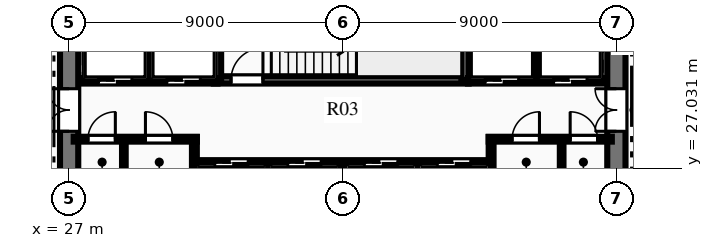
"""IFC4 building model, lengths in metres.
Left out: names, types, materials, properties, quantities, classifications, styles, units other than length and angle.
Written with IfcOpenShell. Run it as: python <this file> out.ifc"""

import sys

from ifc_helpers import new_model, si_unit, direction, frame, frame_2d, origin, place, context, subcontext, project, spatial, rectangle, extrude, element, fill, save


model = new_model("IFC4")
c1 = context("Model", 3, precision=1e-05, world=origin(), true_north=direction((0.0, 1.0)))
c2 = subcontext(c1, "Body", "Model", "MODEL_VIEW")
j1 = project(units=[si_unit("LENGTHUNIT", "METRE"), si_unit("PLANEANGLEUNIT", "RADIAN")], contexts=[c1])
p1 = place(None, origin())
s1 = spatial("IfcSite", under=j1, at=p1, CompositionType="ELEMENT")
p2 = place(p1, origin())
s2 = spatial("IfcBuilding", under=s1, at=p2, CompositionType="ELEMENT")
p3 = place(p2, frame((0.0, 0.0, 66.45)))
s3 = spatial("IfcBuildingStorey", under=s2, at=p3, CompositionType="ELEMENT", Elevation=66.45)
p4 = place(p3, frame((27.0, 18.3, 0.0), z_axis=(0.0, 0.0, 1.0), x_axis=(0.0, 1.0, 0.0)))
e1 = element("IfcWall", 1, at=p4, inside=s3, PredefinedType="SHEAR", context=c2, shape_type="SweptSolid", body=[
    extrude(rectangle(XDim=15.4, YDim=0.6, at=frame_2d((7.7, 0.0))), origin(), (0.0, 0.0, 1.0), 3.75),
])
p5 = place(p4, frame((9.94, 0.0, 0.0)))
e2 = element("IfcOpeningElement", 2, at=p5, cuts=e1, PredefinedType="OPENING", context=c2, shape_type="SweptSolid", body=[
    extrude(rectangle(XDim=1.4, YDim=2.2, at=frame_2d((0.7, 1.1))), frame((0.0, 0.31, 0.0), z_axis=(0.0, -1.0, 0.0), x_axis=(1.0, 0.0, 0.0)), (0.0, 0.0, 1.0), 0.62),
])
p6 = place(p3, frame((45.0, 18.3, 0.0), z_axis=(0.0, 0.0, 1.0), x_axis=(0.0, 1.0, 0.0)))
e3 = element("IfcWall", 3, at=p6, inside=s3, PredefinedType="SHEAR", context=c2, shape_type="SweptSolid", body=[
    extrude(rectangle(XDim=15.4, YDim=0.6, at=frame_2d((7.7, 0.0))), origin(), (0.0, 0.0, 1.0), 3.75),
])
p7 = place(p6, frame((9.94, 0.0, 0.0)))
e4 = element("IfcOpeningElement", 4, at=p7, cuts=e3, PredefinedType="OPENING", context=c2, shape_type="SweptSolid", body=[
    extrude(rectangle(XDim=1.4, YDim=2.2, at=frame_2d((0.7, 1.1))), frame((0.0, 0.31, 0.0), z_axis=(0.0, -1.0, 0.0), x_axis=(1.0, 0.0, 0.0)), (0.0, 0.0, 1.0), 0.62),
])
p8 = place(p3, frame((31.76, 29.93, 0.0), z_axis=(0.0, 0.0, 1.0), x_axis=(1.0, 0.0, 0.0)))
e5 = element("IfcWall", 5, at=p8, inside=s3, PredefinedType="SHEAR", context=c2, shape_type="SweptSolid", body=[
    extrude(rectangle(XDim=8.38, YDim=0.24, at=frame_2d((4.19, 0.0))), origin(), (0.0, 0.0, 1.0), 3.75),
])
p9 = place(p8, frame((0.565, 0.0, 0.0)))
e6 = element("IfcOpeningElement", 6, at=p9, cuts=e5, PredefinedType="OPENING", context=c2, shape_type="SweptSolid", body=[
    extrude(rectangle(XDim=1.05, YDim=2.15, at=frame_2d((0.525, 1.075))), frame((0.0, 0.13, 0.0), z_axis=(0.0, -1.0, 0.0), x_axis=(1.0, 0.0, 0.0)), (0.0, 0.0, 1.0), 0.26),
])
p10 = place(p3, frame((31.88, 29.93, 0.0), z_axis=(0.0, 0.0, 1.0), x_axis=(0.0, 1.0, 0.0)))
e7 = element("IfcWall", 7, at=p10, inside=s3, PredefinedType="SHEAR", context=c2, shape_type="SweptSolid", body=[
    extrude(rectangle(XDim=3.79, YDim=0.24, at=frame_2d((1.895, 0.0))), origin(), (0.0, 0.0, 1.0), 3.75),
])
p11 = place(p3, frame((40.02, 29.93, 0.0), z_axis=(0.0, 0.0, 1.0), x_axis=(0.0, 1.0, 0.0)))
e8 = element("IfcWall", 8, at=p11, inside=s3, PredefinedType="SHEAR", context=c2, shape_type="SweptSolid", body=[
    extrude(rectangle(XDim=3.85, YDim=0.24, at=frame_2d((1.925, 0.0))), origin(), (0.0, 0.0, 1.0), 3.75),
])
p12 = place(p3, frame((27.15, 27.98, 0.0), z_axis=(0.0, 0.0, 1.0), x_axis=(1.0, 0.0, 0.0)))
e9 = element("IfcWall", 9, at=p12, inside=s3, PredefinedType="PARTITIONING", context=c2, shape_type="SweptSolid", body=[
    extrude(rectangle(XDim=4.05, YDim=0.16, at=frame_2d((2.025, 0.0))), origin(), (0.0, 0.0, 1.0), 3.44),
])
p13 = place(p12, frame((0.47, 0.0, 0.0)))
e10 = element("IfcOpeningElement", 10, at=p13, cuts=e9, PredefinedType="OPENING", context=c2, shape_type="SweptSolid", body=[
    extrude(rectangle(XDim=0.9, YDim=2.15, at=frame_2d((0.45, 1.075))), frame((0.0, 0.09, 0.0), z_axis=(0.0, -1.0, 0.0), x_axis=(1.0, 0.0, 0.0)), (0.0, 0.0, 1.0), 0.18),
])
p14 = place(p12, frame((2.36, 0.0, 0.0)))
e11 = element("IfcOpeningElement", 11, at=p14, cuts=e9, PredefinedType="OPENING", context=c2, shape_type="SweptSolid", body=[
    extrude(rectangle(XDim=0.9, YDim=2.15, at=frame_2d((0.45, 1.075))), frame((0.0, 0.09, 0.0), z_axis=(0.0, -1.0, 0.0), x_axis=(1.0, 0.0, 0.0)), (0.0, 0.0, 1.0), 0.18),
])
p15 = place(p3, frame((31.12, 26.54, 0.0), z_axis=(0.0, 0.0, 1.0), x_axis=(0.0, 1.0, 0.0)))
e12 = element("IfcWall", 12, at=p15, inside=s3, PredefinedType="PARTITIONING", context=c2, shape_type="SweptSolid", body=[
    extrude(rectangle(XDim=1.51, YDim=0.16, at=frame_2d((0.755, 0.0))), origin(), (0.0, 0.0, 1.0), 3.44),
])
p16 = place(p3, frame((40.8, 27.98, 0.0), z_axis=(0.0, 0.0, 1.0), x_axis=(1.0, 0.0, 0.0)))
e13 = element("IfcWall", 13, at=p16, inside=s3, PredefinedType="PARTITIONING", context=c2, shape_type="SweptSolid", body=[
    extrude(rectangle(XDim=4.05, YDim=0.16, at=frame_2d((2.025, 0.0))), origin(), (0.0, 0.0, 1.0), 3.44),
])
p17 = place(p16, frame((0.77, 0.0, 0.0)))
e14 = element("IfcOpeningElement", 14, at=p17, cuts=e13, PredefinedType="OPENING", context=c2, shape_type="SweptSolid", body=[
    extrude(rectangle(XDim=0.9, YDim=2.15, at=frame_2d((0.45, 1.075))), frame((0.0, 0.09, 0.0), z_axis=(0.0, -1.0, 0.0), x_axis=(1.0, 0.0, 0.0)), (0.0, 0.0, 1.0), 0.18),
])
p18 = place(p16, frame((2.68, 0.0, 0.0)))
e15 = element("IfcOpeningElement", 15, at=p18, cuts=e13, PredefinedType="OPENING", context=c2, shape_type="SweptSolid", body=[
    extrude(rectangle(XDim=0.9, YDim=2.15, at=frame_2d((0.45, 1.075))), frame((0.0, 0.09, 0.0), z_axis=(0.0, -1.0, 0.0), x_axis=(1.0, 0.0, 0.0)), (0.0, 0.0, 1.0), 0.18),
])
p19 = place(p3, frame((40.88, 26.54, 0.0), z_axis=(0.0, 0.0, 1.0), x_axis=(0.0, 1.0, 0.0)))
e16 = element("IfcWall", 16, at=p19, inside=s3, PredefinedType="PARTITIONING", context=c2, shape_type="SweptSolid", body=[
    extrude(rectangle(XDim=1.51, YDim=0.16, at=frame_2d((0.755, 0.0))), origin(), (0.0, 0.0, 1.0), 3.44),
])
for number, where, z_axis, x_axis in (
    (17, (28.8, 26.54, 0.0), (0.0, 0.0, 1.0), (0.0, 1.0, 0.0)),
    (18, (43.2, 26.54, 0.0), (0.0, 0.0, 1.0), (0.0, 1.0, 0.0)),
):
    element("IfcWall", number, at=place(p3, frame(where, z_axis=z_axis, x_axis=x_axis)), inside=s3, PredefinedType="PARTITIONING", context=c2, shape_type="SweptSolid", body=[
        extrude(rectangle(XDim=1.44, YDim=0.12, at=frame_2d((0.72, 0.0))), origin(), (0.0, 0.0, 1.0), 3.44),
    ])
p20 = place(p3, frame((27.45, 29.9, 0.0), z_axis=(0.0, 0.0, 1.0), x_axis=(1.0, 0.0, 0.0)))
e19 = element("IfcWall", 19, at=p20, inside=s3, PredefinedType="PARTITIONING", context=c2, shape_type="SweptSolid", body=[
    extrude(rectangle(XDim=4.43, YDim=0.18, at=frame_2d((2.215, 0.0))), origin(), (0.0, 0.0, 1.0), 3.44),
])
p21 = place(p20, frame((0.515, 0.0, 0.0)))
e20 = element("IfcOpeningElement", 20, at=p21, cuts=e19, PredefinedType="OPENING", context=c2, shape_type="SweptSolid", body=[
    extrude(rectangle(XDim=1.1, YDim=2.15, at=frame_2d((0.55, 1.075))), frame((0.0, 0.1, 0.0), z_axis=(0.0, -1.0, 0.0), x_axis=(1.0, 0.0, 0.0)), (0.0, 0.0, 1.0), 0.2),
])
p22 = place(p20, frame((2.765, 0.0, 0.0)))
e21 = element("IfcOpeningElement", 21, at=p22, cuts=e19, PredefinedType="OPENING", context=c2, shape_type="SweptSolid", body=[
    extrude(rectangle(XDim=1.1, YDim=2.15, at=frame_2d((0.55, 1.075))), frame((0.0, 0.1, 0.0), z_axis=(0.0, -1.0, 0.0), x_axis=(1.0, 0.0, 0.0)), (0.0, 0.0, 1.0), 0.2),
])
p23 = place(p3, frame((29.63, 29.9, 0.0), z_axis=(0.0, 0.0, 1.0), x_axis=(0.0, 1.0, 0.0)))
e22 = element("IfcWall", 22, at=p23, inside=s3, PredefinedType="PARTITIONING", context=c2, shape_type="SweptSolid", body=[
    extrude(rectangle(XDim=3.75, YDim=0.18, at=frame_2d((1.875, 0.0))), origin(), (0.0, 0.0, 1.0), 3.44),
])
p24 = place(p3, frame((40.12, 29.9, 0.0), z_axis=(0.0, 0.0, 1.0), x_axis=(1.0, 0.0, 0.0)))
e23 = element("IfcWall", 23, at=p24, inside=s3, PredefinedType="PARTITIONING", context=c2, shape_type="SweptSolid", body=[
    extrude(rectangle(XDim=4.43, YDim=0.18, at=frame_2d((2.215, 0.0))), origin(), (0.0, 0.0, 1.0), 3.44),
])
p25 = place(p24, frame((0.565, 0.0, 0.0)))
e24 = element("IfcOpeningElement", 24, at=p25, cuts=e23, PredefinedType="OPENING", context=c2, shape_type="SweptSolid", body=[
    extrude(rectangle(XDim=1.1, YDim=2.15, at=frame_2d((0.55, 1.075))), frame((0.0, 0.1, 0.0), z_axis=(0.0, -1.0, 0.0), x_axis=(1.0, 0.0, 0.0)), (0.0, 0.0, 1.0), 0.2),
])
p26 = place(p24, frame((2.815, 0.0, 0.0)))
e25 = element("IfcOpeningElement", 25, at=p26, cuts=e23, PredefinedType="OPENING", context=c2, shape_type="SweptSolid", body=[
    extrude(rectangle(XDim=1.1, YDim=2.15, at=frame_2d((0.55, 1.075))), frame((0.0, 0.1, 0.0), z_axis=(0.0, -1.0, 0.0), x_axis=(1.0, 0.0, 0.0)), (0.0, 0.0, 1.0), 0.2),
])
p27 = place(p3, frame((42.37, 29.9, 0.0), z_axis=(0.0, 0.0, 1.0), x_axis=(0.0, 1.0, 0.0)))
e26 = element("IfcWall", 26, at=p27, inside=s3, PredefinedType="PARTITIONING", context=c2, shape_type="SweptSolid", body=[
    extrude(rectangle(XDim=3.75, YDim=0.18, at=frame_2d((1.875, 0.0))), origin(), (0.0, 0.0, 1.0), 3.44),
])
p28 = place(p3, frame((31.2, 27.2, 0.0), z_axis=(0.0, 0.0, 1.0), x_axis=(1.0, 0.0, 0.0)))
e27 = element("IfcWall", 27, at=p28, inside=s3, PredefinedType="PARTITIONING", context=c2, shape_type="SweptSolid", body=[
    extrude(rectangle(XDim=9.6, YDim=0.18, at=frame_2d((4.8, 0.0))), origin(), (0.0, 0.0, 1.0), 3.44),
])
p29 = place(p28, frame((0.59, 0.0, 0.0)))
e28 = element("IfcOpeningElement", 28, at=p29, cuts=e27, PredefinedType="OPENING", context=c2, shape_type="SweptSolid", body=[
    extrude(rectangle(XDim=1.1, YDim=2.15, at=frame_2d((0.55, 1.075))), frame((0.0, 0.1, 0.0), z_axis=(0.0, -1.0, 0.0), x_axis=(1.0, 0.0, 0.0)), (0.0, 0.0, 1.0), 0.2),
])
p30 = place(p28, frame((2.99, 0.0, 0.0)))
e29 = element("IfcOpeningElement", 29, at=p30, cuts=e27, PredefinedType="OPENING", context=c2, shape_type="SweptSolid", body=[
    extrude(rectangle(XDim=1.1, YDim=2.15, at=frame_2d((0.55, 1.075))), frame((0.0, 0.1, 0.0), z_axis=(0.0, -1.0, 0.0), x_axis=(1.0, 0.0, 0.0)), (0.0, 0.0, 1.0), 0.2),
])
p31 = place(p28, frame((5.51, 0.0, 0.0)))
e30 = element("IfcOpeningElement", 30, at=p31, cuts=e27, PredefinedType="OPENING", context=c2, shape_type="SweptSolid", body=[
    extrude(rectangle(XDim=1.1, YDim=2.15, at=frame_2d((0.55, 1.075))), frame((0.0, 0.1, 0.0), z_axis=(0.0, -1.0, 0.0), x_axis=(1.0, 0.0, 0.0)), (0.0, 0.0, 1.0), 0.2),
])
p32 = place(p28, frame((7.91, 0.0, 0.0)))
e31 = element("IfcOpeningElement", 31, at=p32, cuts=e27, PredefinedType="OPENING", context=c2, shape_type="SweptSolid", body=[
    extrude(rectangle(XDim=1.1, YDim=2.15, at=frame_2d((0.55, 1.075))), frame((0.0, 0.1, 0.0), z_axis=(0.0, -1.0, 0.0), x_axis=(1.0, 0.0, 0.0)), (0.0, 0.0, 1.0), 0.2),
])
for number, where, z_axis, x_axis in (
    (32, (33.54, 25.3, 0.0), (0.0, 0.0, 1.0), (0.0, 1.0, 0.0)),
    (33, (36.0, 25.3, 0.0), (0.0, 0.0, 1.0), (0.0, 1.0, 0.0)),
    (34, (38.46, 25.3, 0.0), (0.0, 0.0, 1.0), (0.0, 1.0, 0.0)),
):
    element("IfcWall", number, at=place(p3, frame(where, z_axis=z_axis, x_axis=x_axis)), inside=s3, PredefinedType="PARTITIONING", context=c2, shape_type="SweptSolid", body=[
        extrude(rectangle(XDim=1.9, YDim=0.18, at=frame_2d((0.95, 0.0))), origin(), (0.0, 0.0, 1.0), 3.44),
    ])
p33 = place(p13, origin())
e35 = element("IfcDoor", 35, at=p33, inside=s3, OperationType="SINGLE_SWING_RIGHT", PredefinedType="DOOR", context=c2, shape_type="SweptSolid", body=[
    extrude(rectangle(XDim=0.9, YDim=2.15, at=frame_2d((0.45, 1.075))), frame((0.0, 0.025, 0.0), z_axis=(0.0, -1.0, 0.0), x_axis=(1.0, 0.0, 0.0)), (0.0, 0.0, 1.0), 0.05),
])
fill(e10, e35)
p34 = place(p14, origin())
e36 = element("IfcDoor", 36, at=p34, inside=s3, OperationType="SINGLE_SWING_LEFT", PredefinedType="DOOR", context=c2, shape_type="SweptSolid", body=[
    extrude(rectangle(XDim=0.9, YDim=2.15, at=frame_2d((0.45, 1.075))), frame((0.0, 0.025, 0.0), z_axis=(0.0, -1.0, 0.0), x_axis=(1.0, 0.0, 0.0)), (0.0, 0.0, 1.0), 0.05),
])
fill(e11, e36)
p35 = place(p17, origin())
e37 = element("IfcDoor", 37, at=p35, inside=s3, OperationType="SINGLE_SWING_RIGHT", PredefinedType="DOOR", context=c2, shape_type="SweptSolid", body=[
    extrude(rectangle(XDim=0.9, YDim=2.15, at=frame_2d((0.45, 1.075))), frame((0.0, 0.025, 0.0), z_axis=(0.0, -1.0, 0.0), x_axis=(1.0, 0.0, 0.0)), (0.0, 0.0, 1.0), 0.05),
])
fill(e14, e37)
p36 = place(p18, origin())
e38 = element("IfcDoor", 38, at=p36, inside=s3, OperationType="SINGLE_SWING_LEFT", PredefinedType="DOOR", context=c2, shape_type="SweptSolid", body=[
    extrude(rectangle(XDim=0.9, YDim=2.15, at=frame_2d((0.45, 1.075))), frame((0.0, 0.025, 0.0), z_axis=(0.0, -1.0, 0.0), x_axis=(1.0, 0.0, 0.0)), (0.0, 0.0, 1.0), 0.05),
])
fill(e15, e38)
p37 = place(p9, origin())
e39 = element("IfcDoor", 39, at=p37, inside=s3, OperationType="SINGLE_SWING_RIGHT", PredefinedType="DOOR", context=c2, shape_type="SweptSolid", body=[
    extrude(rectangle(XDim=1.05, YDim=2.15, at=frame_2d((0.525, 1.075))), frame((0.0, 0.025, 0.0), z_axis=(0.0, -1.0, 0.0), x_axis=(1.0, 0.0, 0.0)), (0.0, 0.0, 1.0), 0.05),
])
fill(e6, e39)
p38 = place(p5, origin())
e40 = element("IfcDoor", 40, at=p38, inside=s3, OperationType="DOUBLE_DOOR_SINGLE_SWING", PredefinedType="DOOR", context=c2, shape_type="SweptSolid", body=[
    extrude(rectangle(XDim=1.4, YDim=2.2, at=frame_2d((0.7, 1.1))), frame((0.0, 0.025, 0.0), z_axis=(0.0, -1.0, 0.0), x_axis=(1.0, 0.0, 0.0)), (0.0, 0.0, 1.0), 0.05),
])
fill(e2, e40)
p39 = place(p7, origin())
e41 = element("IfcDoor", 41, at=p39, inside=s3, OperationType="DOUBLE_DOOR_SINGLE_SWING", PredefinedType="DOOR", context=c2, shape_type="SweptSolid", body=[
    extrude(rectangle(XDim=1.4, YDim=2.2, at=frame_2d((0.7, 1.1))), frame((0.0, 0.025, 0.0), z_axis=(0.0, -1.0, 0.0), x_axis=(1.0, 0.0, 0.0)), (0.0, 0.0, 1.0), 0.05),
])
fill(e4, e41)
p40 = place(p21, origin())
e42 = element("IfcDoor", 42, at=p40, inside=s3, OperationType="SLIDING_TO_LEFT", PredefinedType="DOOR", context=c2, shape_type="SweptSolid", body=[
    extrude(rectangle(XDim=1.1, YDim=2.15, at=frame_2d((0.55, 1.075))), frame((0.0, 0.025, 0.0), z_axis=(0.0, -1.0, 0.0), x_axis=(1.0, 0.0, 0.0)), (0.0, 0.0, 1.0), 0.05),
])
fill(e20, e42)
p41 = place(p22, origin())
e43 = element("IfcDoor", 43, at=p41, inside=s3, OperationType="SLIDING_TO_LEFT", PredefinedType="DOOR", context=c2, shape_type="SweptSolid", body=[
    extrude(rectangle(XDim=1.1, YDim=2.15, at=frame_2d((0.55, 1.075))), frame((0.0, 0.025, 0.0), z_axis=(0.0, -1.0, 0.0), x_axis=(1.0, 0.0, 0.0)), (0.0, 0.0, 1.0), 0.05),
])
fill(e21, e43)
p42 = place(p25, origin())
e44 = element("IfcDoor", 44, at=p42, inside=s3, OperationType="SLIDING_TO_LEFT", PredefinedType="DOOR", context=c2, shape_type="SweptSolid", body=[
    extrude(rectangle(XDim=1.1, YDim=2.15, at=frame_2d((0.55, 1.075))), frame((0.0, 0.025, 0.0), z_axis=(0.0, -1.0, 0.0), x_axis=(1.0, 0.0, 0.0)), (0.0, 0.0, 1.0), 0.05),
])
fill(e24, e44)
p43 = place(p26, origin())
e45 = element("IfcDoor", 45, at=p43, inside=s3, OperationType="SLIDING_TO_LEFT", PredefinedType="DOOR", context=c2, shape_type="SweptSolid", body=[
    extrude(rectangle(XDim=1.1, YDim=2.15, at=frame_2d((0.55, 1.075))), frame((0.0, 0.025, 0.0), z_axis=(0.0, -1.0, 0.0), x_axis=(1.0, 0.0, 0.0)), (0.0, 0.0, 1.0), 0.05),
])
fill(e25, e45)
p44 = place(p29, origin())
e46 = element("IfcDoor", 46, at=p44, inside=s3, OperationType="SLIDING_TO_LEFT", PredefinedType="DOOR", context=c2, shape_type="SweptSolid", body=[
    extrude(rectangle(XDim=1.1, YDim=2.15, at=frame_2d((0.55, 1.075))), frame((0.0, 0.025, 0.0), z_axis=(0.0, -1.0, 0.0), x_axis=(1.0, 0.0, 0.0)), (0.0, 0.0, 1.0), 0.05),
])
fill(e28, e46)
p45 = place(p30, origin())
e47 = element("IfcDoor", 47, at=p45, inside=s3, OperationType="SLIDING_TO_LEFT", PredefinedType="DOOR", context=c2, shape_type="SweptSolid", body=[
    extrude(rectangle(XDim=1.1, YDim=2.15, at=frame_2d((0.55, 1.075))), frame((0.0, 0.025, 0.0), z_axis=(0.0, -1.0, 0.0), x_axis=(1.0, 0.0, 0.0)), (0.0, 0.0, 1.0), 0.05),
])
fill(e29, e47)
p46 = place(p31, origin())
e48 = element("IfcDoor", 48, at=p46, inside=s3, OperationType="SLIDING_TO_LEFT", PredefinedType="DOOR", context=c2, shape_type="SweptSolid", body=[
    extrude(rectangle(XDim=1.1, YDim=2.15, at=frame_2d((0.55, 1.075))), frame((0.0, 0.025, 0.0), z_axis=(0.0, -1.0, 0.0), x_axis=(1.0, 0.0, 0.0)), (0.0, 0.0, 1.0), 0.05),
])
fill(e30, e48)
p47 = place(p32, origin())
e49 = element("IfcDoor", 49, at=p47, inside=s3, OperationType="SLIDING_TO_LEFT", PredefinedType="DOOR", context=c2, shape_type="SweptSolid", body=[
    extrude(rectangle(XDim=1.1, YDim=2.15, at=frame_2d((0.55, 1.075))), frame((0.0, 0.025, 0.0), z_axis=(0.0, -1.0, 0.0), x_axis=(1.0, 0.0, 0.0)), (0.0, 0.0, 1.0), 0.05),
])
fill(e31, e49)
save(model, sys.argv[1])
